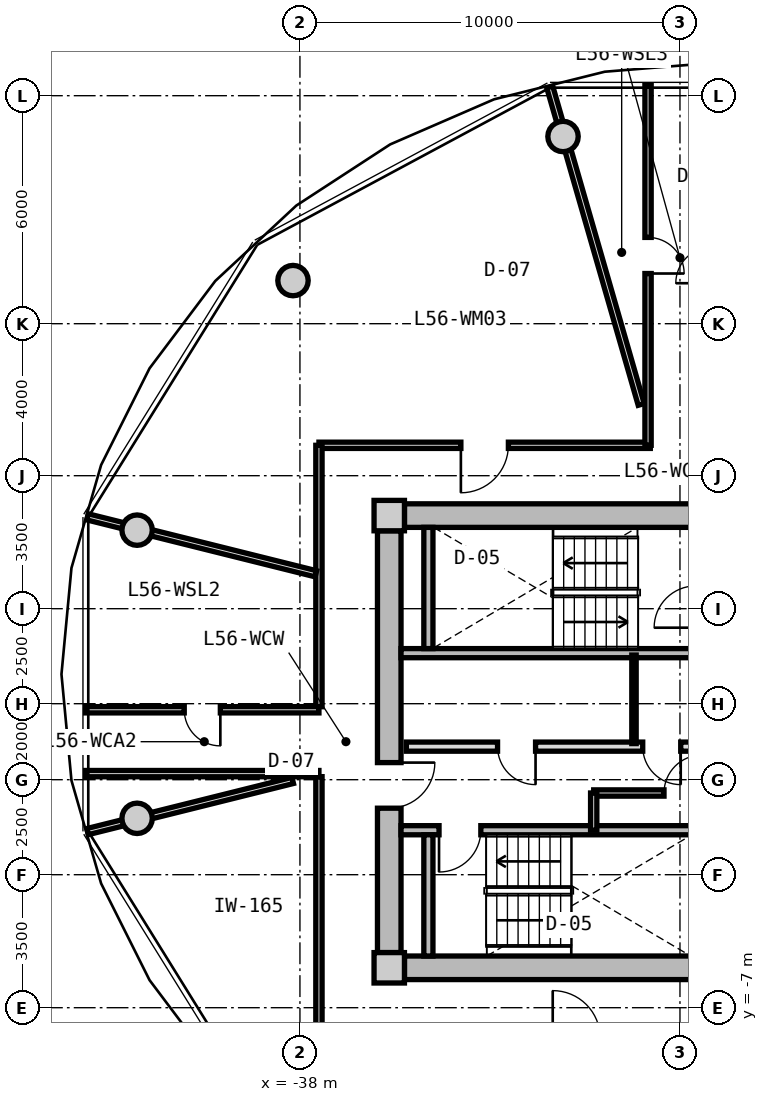
"""IFC4 building model, lengths in metres.
Left out: names, types, materials, properties, quantities, classifications, styles, units other than length and angle.
Written with IfcOpenShell. Run it as: python <this file> out.ifc"""

import sys

from ifc_helpers import new_model, si_unit, direction, frame, frame_2d, origin, origin_2d, place, context, subcontext, project, spatial, rectangle, circle, extrude, source, transform, mapped, element, fill, save


model = new_model("IFC4")
c1 = context("Model", 3, precision=1e-05, world=origin(), true_north=direction((0.0, 1.0)))
c2 = subcontext(c1, "Body", "Model", "MODEL_VIEW")
j1 = project(units=[si_unit("LENGTHUNIT", "METRE"), si_unit("PLANEANGLEUNIT", "RADIAN")], contexts=[c1])
p1 = place(None, origin())
s1 = spatial("IfcSite", under=j1, at=p1, CompositionType="ELEMENT")
p2 = place(p1, origin())
s2 = spatial("IfcBuilding", under=s1, at=p2, CompositionType="ELEMENT")
p3 = place(p2, frame((0.0, 0.0, 180.05)))
s3 = spatial("IfcBuildingStorey", under=s2, at=p3, CompositionType="ELEMENT", Elevation=180.05)
m1 = source(origin(), c2, "Body", "SweptSolid", [
    extrude(rectangle(XDim=0.8, YDim=0.8, at=origin_2d()), origin(), (0.0, 0.0, 1.0), 3.05),
])
for number, where, z_axis, x_axis in (
    (1, (-35.65, -5.95, 0.0), (0.0, 0.0, 1.0), (1.0, 0.0, 0.0)),
    (2, (-35.65, 5.95, 0.0), (0.0, 0.0, 1.0), (1.0, 0.0, 0.0)),
):
    element("IfcColumn", number, at=place(p3, frame(where, z_axis=z_axis, x_axis=x_axis)), inside=s3, PredefinedType="COLUMN", context=c2, shape_type="MappedRepresentation", body=[
        mapped(m1, transform((0.0, 0.0, 0.0), x_axis=(1.0, 0.0, 0.0), y_axis=(0.0, 1.0, 0.0), z_axis=(0.0, 0.0, 1.0), scale=1.0)),
    ])
m2 = source(origin(), c2, "Body", "SweptSolid", [
    extrude(rectangle(XDim=14.5, YDim=0.62, at=frame_2d((7.25, 0.0))), origin(), (0.0, 0.0, 1.0), 2.81),
])
for number, where, z_axis, x_axis in (
    (3, (-35.25, 5.95, 0.0), (0.0, 0.0, 1.0), (1.0, 0.0, 0.0)),
    (4, (-20.75, -5.95, 0.0), (0.0, 0.0, 1.0), (-1.0, 0.0, 0.0)),
):
    element("IfcWall", number, at=place(p3, frame(where, z_axis=z_axis, x_axis=x_axis)), inside=s3, PredefinedType="SHEAR", context=c2, shape_type="MappedRepresentation", body=[
        mapped(m2, transform((0.0, 0.0, 0.0), x_axis=(1.0, 0.0, 0.0), y_axis=(0.0, 1.0, 0.0), z_axis=(0.0, 0.0, 1.0), scale=1.0)),
    ])
m3 = source(origin(), c2, "Body", "SweptSolid", [
    extrude(rectangle(XDim=11.1, YDim=0.62, at=frame_2d((5.55, 0.0))), origin(), (0.0, 0.0, 1.0), 2.81),
])
p4 = place(p3, frame((-35.65, -5.55, 0.0), z_axis=(0.0, 0.0, 1.0), x_axis=(0.0, 1.0, 0.0)))
e5 = element("IfcWall", 5, at=p4, inside=s3, PredefinedType="SHEAR", context=c2, shape_type="MappedRepresentation", body=[
    mapped(m3, transform((0.0, 0.0, 0.0), x_axis=(1.0, 0.0, 0.0), y_axis=(0.0, 1.0, 0.0), z_axis=(0.0, 0.0, 1.0), scale=1.0)),
])
p5 = place(p4, frame((3.8, 0.0, 0.0)))
e6 = element("IfcOpeningElement", 6, at=p5, cuts=e5, PredefinedType="OPENING", context=c2, shape_type="SweptSolid", body=[
    extrude(rectangle(XDim=1.2, YDim=2.15, at=frame_2d((0.6, 1.075))), frame((0.0, 0.32, 0.0), z_axis=(0.0, -1.0, 0.0), x_axis=(1.0, 0.0, 0.0)), (0.0, 0.0, 1.0), 0.64),
])
m4 = source(origin(), c2, "Body", "SweptSolid", [
    extrude(circle(Radius=0.4, at=origin_2d()), origin(), (0.0, 0.0, 1.0), 3.05),
])
for number, where, z_axis, x_axis in (
    (7, (-31.077, 15.926, 0.0), (0.0, 0.0, 1.0), (1.0, 0.0, 0.0)),
    (8, (-38.183, 12.135, 0.0), (0.0, 0.0, 1.0), (1.0, 0.0, 0.0)),
    (9, (-42.285, 5.567, 0.0), (0.0, 0.0, 1.0), (1.0, 0.0, 0.0)),
    (10, (-42.285, -2.016, 0.0), (0.0, 0.0, 1.0), (1.0, 0.0, 0.0)),
):
    element("IfcColumn", number, at=place(p3, frame(where, z_axis=z_axis, x_axis=x_axis)), inside=s3, PredefinedType="COLUMN", context=c2, shape_type="MappedRepresentation", body=[
        mapped(m4, transform((0.0, 0.0, 0.0), x_axis=(1.0, 0.0, 0.0), y_axis=(0.0, 1.0, 0.0), z_axis=(0.0, 0.0, 1.0), scale=1.0)),
    ])
m5 = source(origin(), c2, "Body", "SweptSolid", [
    extrude(rectangle(XDim=7.88, YDim=0.24, at=frame_2d((3.94, 0.0))), origin(), (0.0, 0.0, 1.0), 2.81),
])
p6 = place(p3, frame((-35.34, 2.33, 0.0), z_axis=(0.0, 0.0, 1.0), x_axis=(1.0, 0.0, 0.0)))
e11 = element("IfcWall", 11, at=p6, inside=s3, PredefinedType="PARTITIONING", context=c2, shape_type="MappedRepresentation", body=[
    mapped(m5, transform((0.0, 0.0, 0.0), x_axis=(1.0, 0.0, 0.0), y_axis=(0.0, 1.0, 0.0), z_axis=(0.0, 0.0, 1.0), scale=1.0)),
])
m6 = source(origin(), c2, "Body", "SweptSolid", [
    extrude(rectangle(XDim=3.19, YDim=0.24, at=frame_2d((1.595, 0.0))), origin(), (0.0, 0.0, 1.0), 2.81),
])
p7 = place(p3, frame((-34.62, 2.45, 0.0), z_axis=(0.0, 0.0, 1.0), x_axis=(0.0, 1.0, 0.0)))
e12 = element("IfcWall", 12, at=p7, inside=s3, PredefinedType="PARTITIONING", context=c2, shape_type="MappedRepresentation", body=[
    mapped(m6, transform((0.0, 0.0, 0.0), x_axis=(1.0, 0.0, 0.0), y_axis=(0.0, 1.0, 0.0), z_axis=(0.0, 0.0, 1.0), scale=1.0)),
])
p8 = place(p3, frame((-35.34, -2.33, 0.0), z_axis=(0.0, 0.0, 1.0), x_axis=(1.0, 0.0, 0.0)))
e13 = element("IfcWall", 13, at=p8, inside=s3, PredefinedType="PARTITIONING", context=c2, shape_type="MappedRepresentation", body=[
    mapped(m5, transform((0.0, 0.0, 0.0), x_axis=(1.0, 0.0, 0.0), y_axis=(0.0, 1.0, 0.0), z_axis=(0.0, 0.0, 1.0), scale=1.0)),
])
p9 = place(p8, frame((1.0, 0.0, 0.0)))
e14 = element("IfcOpeningElement", 14, at=p9, cuts=e13, PredefinedType="OPENING", context=c2, shape_type="SweptSolid", body=[
    extrude(rectangle(XDim=1.1, YDim=2.15, at=frame_2d((0.55, 1.075))), frame((0.0, 0.13, 0.0), z_axis=(0.0, -1.0, 0.0), x_axis=(1.0, 0.0, 0.0)), (0.0, 0.0, 1.0), 0.26),
])
p10 = place(p3, frame((-34.62, -5.64, 0.0), z_axis=(0.0, 0.0, 1.0), x_axis=(0.0, 1.0, 0.0)))
e15 = element("IfcWall", 15, at=p10, inside=s3, PredefinedType="PARTITIONING", context=c2, shape_type="MappedRepresentation", body=[
    mapped(m6, transform((0.0, 0.0, 0.0), x_axis=(1.0, 0.0, 0.0), y_axis=(0.0, 1.0, 0.0), z_axis=(0.0, 0.0, 1.0), scale=1.0)),
])
m7 = source(origin(), c2, "Body", "SweptSolid", [
    extrude(rectangle(XDim=7.62, YDim=0.24, at=frame_2d((3.81, 0.0))), origin(), (0.0, 0.0, 1.0), 2.795),
])
p11 = place(p3, frame((-35.2, -0.13, 0.0), z_axis=(0.0, 0.0, 1.0), x_axis=(1.0, 0.0, 0.0)))
e16 = element("IfcWall", 16, at=p11, inside=s3, PredefinedType="PARTITIONING", context=c2, shape_type="MappedRepresentation", body=[
    mapped(m7, transform((0.0, 0.0, 0.0), x_axis=(1.0, 0.0, 0.0), y_axis=(0.0, 1.0, 0.0), z_axis=(0.0, 0.0, 1.0), scale=1.0)),
])
p12 = place(p11, frame((6.22, 0.0, 0.0)))
e17 = element("IfcOpeningElement", 17, at=p12, cuts=e16, PredefinedType="OPENING", context=c2, shape_type="SweptSolid", body=[
    extrude(rectangle(XDim=1.0, YDim=2.1, at=frame_2d((0.5, 1.05))), frame((0.0, 0.13, 0.0), z_axis=(0.0, -1.0, 0.0), x_axis=(1.0, 0.0, 0.0)), (0.0, 0.0, 1.0), 0.26),
])
p13 = place(p11, frame((2.4, 0.0, 0.0)))
e18 = element("IfcOpeningElement", 18, at=p13, cuts=e16, PredefinedType="OPENING", context=c2, shape_type="SweptSolid", body=[
    extrude(rectangle(XDim=1.0, YDim=2.1, at=frame_2d((0.5, 1.05))), frame((0.0, 0.13, 0.0), z_axis=(0.0, -1.0, 0.0), x_axis=(1.0, 0.0, 0.0)), (0.0, 0.0, 1.0), 0.26),
])
m8 = source(origin(), c2, "Body", "SweptSolid", [
    extrude(rectangle(XDim=2.33, YDim=0.115, at=frame_2d((1.165, 0.0))), origin(), (0.0, 0.0, 1.0), 2.795),
])
p14 = place(p3, frame((-29.21, -0.05, 0.0), z_axis=(0.0, 0.0, 1.0), x_axis=(0.0, 1.0, 0.0)))
e19 = element("IfcWall", 19, at=p14, inside=s3, PredefinedType="PARTITIONING", context=c2, shape_type="MappedRepresentation", body=[
    mapped(m8, transform((0.0, 0.0, 0.0), x_axis=(1.0, 0.0, 0.0), y_axis=(0.0, 1.0, 0.0), z_axis=(0.0, 0.0, 1.0), scale=1.0)),
])
m9 = source(origin(), c2, "Body", "SweptSolid", [
    extrude(rectangle(XDim=4.77, YDim=0.165, at=frame_2d((2.385, 0.0))), origin(), (0.0, 0.0, 1.0), 2.795),
])
p15 = place(p3, frame((-30.27, -1.35, 0.0), z_axis=(0.0, 0.0, 1.0), x_axis=(1.0, 0.0, 0.0)))
e20 = element("IfcWall", 20, at=p15, inside=s3, PredefinedType="PARTITIONING", context=c2, shape_type="MappedRepresentation", body=[
    mapped(m9, transform((0.0, 0.0, 0.0), x_axis=(1.0, 0.0, 0.0), y_axis=(0.0, 1.0, 0.0), z_axis=(0.0, 0.0, 1.0), scale=1.0)),
])
p16 = place(p15, frame((1.85, 0.0, 0.0)))
e21 = element("IfcOpeningElement", 21, at=p16, cuts=e20, PredefinedType="OPENING", context=c2, shape_type="SweptSolid", body=[
    extrude(rectangle(XDim=1.0, YDim=2.1, at=frame_2d((0.5, 1.05))), frame((0.0, 0.093, 0.0), z_axis=(0.0, -1.0, 0.0), x_axis=(1.0, 0.0, 0.0)), (0.0, 0.0, 1.0), 0.185),
])
m10 = source(origin(), c2, "Body", "SweptSolid", [
    extrude(rectangle(XDim=0.98, YDim=0.165, at=frame_2d((0.49, 0.0))), origin(), (0.0, 0.0, 1.0), 2.795),
])
p17 = place(p3, frame((-30.27, -2.33, 0.0), z_axis=(0.0, 0.0, 1.0), x_axis=(0.0, 1.0, 0.0)))
e22 = element("IfcWall", 22, at=p17, inside=s3, PredefinedType="PARTITIONING", context=c2, shape_type="MappedRepresentation", body=[
    mapped(m10, transform((0.0, 0.0, 0.0), x_axis=(1.0, 0.0, 0.0), y_axis=(0.0, 1.0, 0.0), z_axis=(0.0, 0.0, 1.0), scale=1.0)),
])
m11 = source(origin(), c2, "Body", "SweptSolid", [
    extrude(rectangle(XDim=8.719, YDim=0.165, at=frame_2d((4.36, 0.0))), origin(), (0.0, 0.0, 1.0), 2.795),
])
p18 = place(p3, frame((-37.5, 7.8, 0.0), z_axis=(0.0, 0.0, 1.0), x_axis=(1.0, 0.0, 0.0)))
e23 = element("IfcWall", 23, at=p18, inside=s3, PredefinedType="PARTITIONING", context=c2, shape_type="MappedRepresentation", body=[
    mapped(m11, transform((0.0, 0.0, 0.0), x_axis=(1.0, 0.0, 0.0), y_axis=(0.0, 1.0, 0.0), z_axis=(0.0, 0.0, 1.0), scale=1.0)),
])
p19 = place(p18, frame((3.735, 0.0, 0.0)))
e24 = element("IfcOpeningElement", 24, at=p19, cuts=e23, PredefinedType="OPENING", context=c2, shape_type="SweptSolid", body=[
    extrude(rectangle(XDim=1.25, YDim=2.2, at=frame_2d((0.625, 1.1))), frame((0.0, 0.093, 0.0), z_axis=(0.0, -1.0, 0.0), x_axis=(1.0, 0.0, 0.0)), (0.0, 0.0, 1.0), 0.185),
])
m12 = source(origin(), c2, "Body", "SweptSolid", [
    extrude(rectangle(XDim=6.88, YDim=0.165, at=frame_2d((3.44, 0.0))), origin(), (0.0, 0.0, 1.0), 2.795),
])
for number, where, z_axis, x_axis in (
    (25, (-37.5, -7.8, 0.0), (0.0, 0.0, 1.0), (0.0, 1.0, 0.0)),
    (26, (-37.5, 0.92, 0.0), (0.0, 0.0, 1.0), (0.0, 1.0, 0.0)),
):
    element("IfcWall", number, at=place(p3, frame(where, z_axis=z_axis, x_axis=x_axis)), inside=s3, PredefinedType="PARTITIONING", context=c2, shape_type="MappedRepresentation", body=[
        mapped(m12, transform((0.0, 0.0, 0.0), x_axis=(1.0, 0.0, 0.0), y_axis=(0.0, 1.0, 0.0), z_axis=(0.0, 0.0, 1.0), scale=1.0)),
    ])
m13 = source(origin(), c2, "Body", "SweptSolid", [
    extrude(rectangle(XDim=8.695, YDim=0.165, at=frame_2d((4.348, 0.0))), origin(), (0.0, 0.0, 1.0), 2.345),
])
p20 = place(p3, frame((-29.02, 8.875, 0.0), z_axis=(0.0, 0.0, 1.0), x_axis=(-0.276797231892, 0.960928349263, 0.0)))
e27 = element("IfcWall", 27, at=p20, inside=s3, PredefinedType="PARTITIONING", context=c2, shape_type="MappedRepresentation", body=[
    mapped(m13, transform((0.0, 0.0, 0.0), x_axis=(1.0, 0.0, 0.0), y_axis=(0.0, 1.0, 0.0), z_axis=(0.0, 0.0, 1.0), scale=1.0)),
])
m14 = source(origin(), c2, "Body", "SweptSolid", [
    extrude(rectangle(XDim=6.193, YDim=0.165, at=frame_2d((3.096, 0.0))), origin(), (0.0, 0.0, 1.0), 2.345),
])
p21 = place(p3, frame((-37.58, 4.419, 0.0), z_axis=(0.0, 0.0, 1.0), x_axis=(-0.970309243466, 0.241867674657, 0.0)))
e28 = element("IfcWall", 28, at=p21, inside=s3, PredefinedType="PARTITIONING", context=c2, shape_type="MappedRepresentation", body=[
    mapped(m14, transform((0.0, 0.0, 0.0), x_axis=(1.0, 0.0, 0.0), y_axis=(0.0, 1.0, 0.0), z_axis=(0.0, 0.0, 1.0), scale=1.0)),
])
m15 = source(origin(), c2, "Body", "SweptSolid", [
    extrude(rectangle(XDim=5.564, YDim=0.165, at=frame_2d((2.782, 0.0))), origin(), (0.0, 0.0, 1.0), 2.345),
])
p22 = place(p3, frame((-38.19, -1.02, 0.0), z_axis=(0.0, 0.0, 1.0), x_axis=(-0.97031260977, -0.241854169533, 0.0)))
e29 = element("IfcWall", 29, at=p22, inside=s3, PredefinedType="PARTITIONING", context=c2, shape_type="MappedRepresentation", body=[
    mapped(m15, transform((0.0, 0.0, 0.0), x_axis=(1.0, 0.0, 0.0), y_axis=(0.0, 1.0, 0.0), z_axis=(0.0, 0.0, 1.0), scale=1.0)),
])
m16 = source(origin(), c2, "Body", "SweptSolid", [
    extrude(rectangle(XDim=9.48, YDim=0.165, at=frame_2d((4.74, 0.0))), origin(), (0.0, 0.0, 1.0), 2.795),
])
p23 = place(p3, frame((-28.84, 7.8, 0.0), z_axis=(0.0, 0.0, 1.0), x_axis=(0.0, 1.0, 0.0)))
e30 = element("IfcWall", 30, at=p23, inside=s3, PredefinedType="PARTITIONING", context=c2, shape_type="MappedRepresentation", body=[
    mapped(m16, transform((0.0, 0.0, 0.0), x_axis=(1.0, 0.0, 0.0), y_axis=(0.0, 1.0, 0.0), z_axis=(0.0, 0.0, 1.0), scale=1.0)),
])
p24 = place(p23, frame((4.521, 0.0, 0.0)))
e31 = element("IfcOpeningElement", 31, at=p24, cuts=e30, PredefinedType="OPENING", context=c2, shape_type="SweptSolid", body=[
    extrude(rectangle(XDim=0.95, YDim=2.1, at=frame_2d((0.475, 1.05))), frame((0.0, 0.093, 0.0), z_axis=(0.0, -1.0, 0.0), x_axis=(1.0, 0.0, 0.0)), (0.0, 0.0, 1.0), 0.185),
])
m17 = source(origin(), c2, "Body", "SweptSolid", [
    extrude(rectangle(XDim=6.139, YDim=0.165, at=frame_2d((3.069, 0.0))), origin(), (0.0, 0.0, 1.0), 2.795),
])
p25 = place(p3, frame((-43.639, 0.84, 0.0), z_axis=(0.0, 0.0, 1.0), x_axis=(1.0, 0.0, 0.0)))
e32 = element("IfcWall", 32, at=p25, inside=s3, PredefinedType="PARTITIONING", context=c2, shape_type="MappedRepresentation", body=[
    mapped(m17, transform((0.0, 0.0, 0.0), x_axis=(1.0, 0.0, 0.0), y_axis=(0.0, 1.0, 0.0), z_axis=(0.0, 0.0, 1.0), scale=1.0)),
])
p26 = place(p25, frame((2.594, 0.0, 0.0)))
e33 = element("IfcOpeningElement", 33, at=p26, cuts=e32, PredefinedType="OPENING", context=c2, shape_type="SweptSolid", body=[
    extrude(rectangle(XDim=0.95, YDim=2.1, at=frame_2d((0.475, 1.05))), frame((0.0, 0.093, 0.0), z_axis=(0.0, -1.0, 0.0), x_axis=(1.0, 0.0, 0.0)), (0.0, 0.0, 1.0), 0.185),
])
p27 = place(p3, frame((-37.5, -0.84, 0.0), z_axis=(0.0, 0.0, 1.0), x_axis=(-1.0, 0.0, 0.0)))
e34 = element("IfcWall", 34, at=p27, inside=s3, PredefinedType="PARTITIONING", context=c2, shape_type="MappedRepresentation", body=[
    mapped(m17, transform((0.0, 0.0, 0.0), x_axis=(1.0, 0.0, 0.0), y_axis=(0.0, 1.0, 0.0), z_axis=(0.0, 0.0, 1.0), scale=1.0)),
])
m18 = source(origin(), c2, "Body", "SweptSolid", [
    extrude(rectangle(XDim=1.1, YDim=2.15, at=frame_2d((0.55, 1.075))), frame((0.0, 0.025, 0.0), z_axis=(0.0, -1.0, 0.0), x_axis=(1.0, 0.0, 0.0)), (0.0, 0.0, 1.0), 0.05),
])
p28 = place(p9, frame((1.1, 0.0, 0.0), z_axis=(0.0, 0.0, 1.0), x_axis=(-1.0, 0.0, 0.0)))
e35 = element("IfcDoor", 35, at=p28, inside=s3, OperationType="SINGLE_SWING_RIGHT", PredefinedType="DOOR", context=c2, shape_type="MappedRepresentation", body=[
    mapped(m18, transform((0.0, 0.0, 0.0), x_axis=(1.0, 0.0, 0.0), y_axis=(0.0, 1.0, 0.0), z_axis=(0.0, 0.0, 1.0), scale=1.0)),
])
fill(e14, e35)
m19 = source(origin(), c2, "Body", "SweptSolid", [
    extrude(rectangle(XDim=1.2, YDim=2.15, at=frame_2d((0.6, 1.075))), frame((0.0, 0.025, 0.0), z_axis=(0.0, -1.0, 0.0), x_axis=(1.0, 0.0, 0.0)), (0.0, 0.0, 1.0), 0.05),
])
p29 = place(p5, frame((1.2, 0.0, 0.0), z_axis=(0.0, 0.0, 1.0), x_axis=(-1.0, 0.0, 0.0)))
e36 = element("IfcDoor", 36, at=p29, inside=s3, OperationType="SINGLE_SWING_LEFT", PredefinedType="DOOR", context=c2, shape_type="MappedRepresentation", body=[
    mapped(m19, transform((0.0, 0.0, 0.0), x_axis=(1.0, 0.0, 0.0), y_axis=(0.0, 1.0, 0.0), z_axis=(0.0, 0.0, 1.0), scale=1.0)),
])
fill(e6, e36)
m20 = source(origin(), c2, "Body", "SweptSolid", [
    extrude(rectangle(XDim=1.0, YDim=2.1, at=frame_2d((0.5, 1.05))), frame((0.0, 0.025, 0.0), z_axis=(0.0, -1.0, 0.0), x_axis=(1.0, 0.0, 0.0)), (0.0, 0.0, 1.0), 0.05),
])
p30 = place(p12, frame((1.0, 0.0, 0.0), z_axis=(0.0, 0.0, 1.0), x_axis=(-1.0, 0.0, 0.0)))
e37 = element("IfcDoor", 37, at=p30, inside=s3, OperationType="SINGLE_SWING_LEFT", PredefinedType="DOOR", context=c2, shape_type="MappedRepresentation", body=[
    mapped(m20, transform((0.0, 0.0, 0.0), x_axis=(1.0, 0.0, 0.0), y_axis=(0.0, 1.0, 0.0), z_axis=(0.0, 0.0, 1.0), scale=1.0)),
])
fill(e17, e37)
p31 = place(p13, frame((1.0, 0.0, 0.0), z_axis=(0.0, 0.0, 1.0), x_axis=(-1.0, 0.0, 0.0)))
e38 = element("IfcDoor", 38, at=p31, inside=s3, OperationType="SINGLE_SWING_LEFT", PredefinedType="DOOR", context=c2, shape_type="MappedRepresentation", body=[
    mapped(m20, transform((0.0, 0.0, 0.0), x_axis=(1.0, 0.0, 0.0), y_axis=(0.0, 1.0, 0.0), z_axis=(0.0, 0.0, 1.0), scale=1.0)),
])
fill(e18, e38)
p32 = place(p16, origin())
e39 = element("IfcDoor", 39, at=p32, inside=s3, OperationType="SINGLE_SWING_RIGHT", PredefinedType="DOOR", context=c2, shape_type="MappedRepresentation", body=[
    mapped(m20, transform((0.0, 0.0, 0.0), x_axis=(1.0, 0.0, 0.0), y_axis=(0.0, 1.0, 0.0), z_axis=(0.0, 0.0, 1.0), scale=1.0)),
])
fill(e21, e39)
m21 = source(origin(), c2, "Body", "SweptSolid", [
    extrude(rectangle(XDim=0.95, YDim=2.1, at=frame_2d((0.475, 1.05))), frame((0.0, 0.025, 0.0), z_axis=(0.0, -1.0, 0.0), x_axis=(1.0, 0.0, 0.0)), (0.0, 0.0, 1.0), 0.05),
])
p33 = place(p26, frame((0.95, 0.0, 0.0), z_axis=(0.0, 0.0, 1.0), x_axis=(-1.0, 0.0, 0.0)))
e40 = element("IfcDoor", 40, at=p33, inside=s3, OperationType="SINGLE_SWING_LEFT", PredefinedType="DOOR", context=c2, shape_type="MappedRepresentation", body=[
    mapped(m21, transform((0.0, 0.0, 0.0), x_axis=(1.0, 0.0, 0.0), y_axis=(0.0, 1.0, 0.0), z_axis=(0.0, 0.0, 1.0), scale=1.0)),
])
fill(e33, e40)
p34 = place(p24, frame((0.95, 0.0, 0.0), z_axis=(0.0, 0.0, 1.0), x_axis=(-1.0, 0.0, 0.0)))
e41 = element("IfcDoor", 41, at=p34, inside=s3, OperationType="SINGLE_SWING_RIGHT", PredefinedType="DOOR", context=c2, shape_type="MappedRepresentation", body=[
    mapped(m21, transform((0.0, 0.0, 0.0), x_axis=(1.0, 0.0, 0.0), y_axis=(0.0, 1.0, 0.0), z_axis=(0.0, 0.0, 1.0), scale=1.0)),
])
fill(e31, e41)
m22 = source(origin(), c2, "Body", "SweptSolid", [
    extrude(rectangle(XDim=1.25, YDim=2.2, at=frame_2d((0.625, 1.1))), frame((0.0, 0.025, 0.0), z_axis=(0.0, -1.0, 0.0), x_axis=(1.0, 0.0, 0.0)), (0.0, 0.0, 1.0), 0.05),
])
p35 = place(p19, frame((1.25, 0.0, 0.0), z_axis=(0.0, 0.0, 1.0), x_axis=(-1.0, 0.0, 0.0)))
e42 = element("IfcDoor", 42, at=p35, inside=s3, OperationType="SINGLE_SWING_RIGHT", PredefinedType="DOOR", context=c2, shape_type="MappedRepresentation", body=[
    mapped(m22, transform((0.0, 0.0, 0.0), x_axis=(1.0, 0.0, 0.0), y_axis=(0.0, 1.0, 0.0), z_axis=(0.0, 0.0, 1.0), scale=1.0)),
])
fill(e24, e42)
save(model, sys.argv[1])
